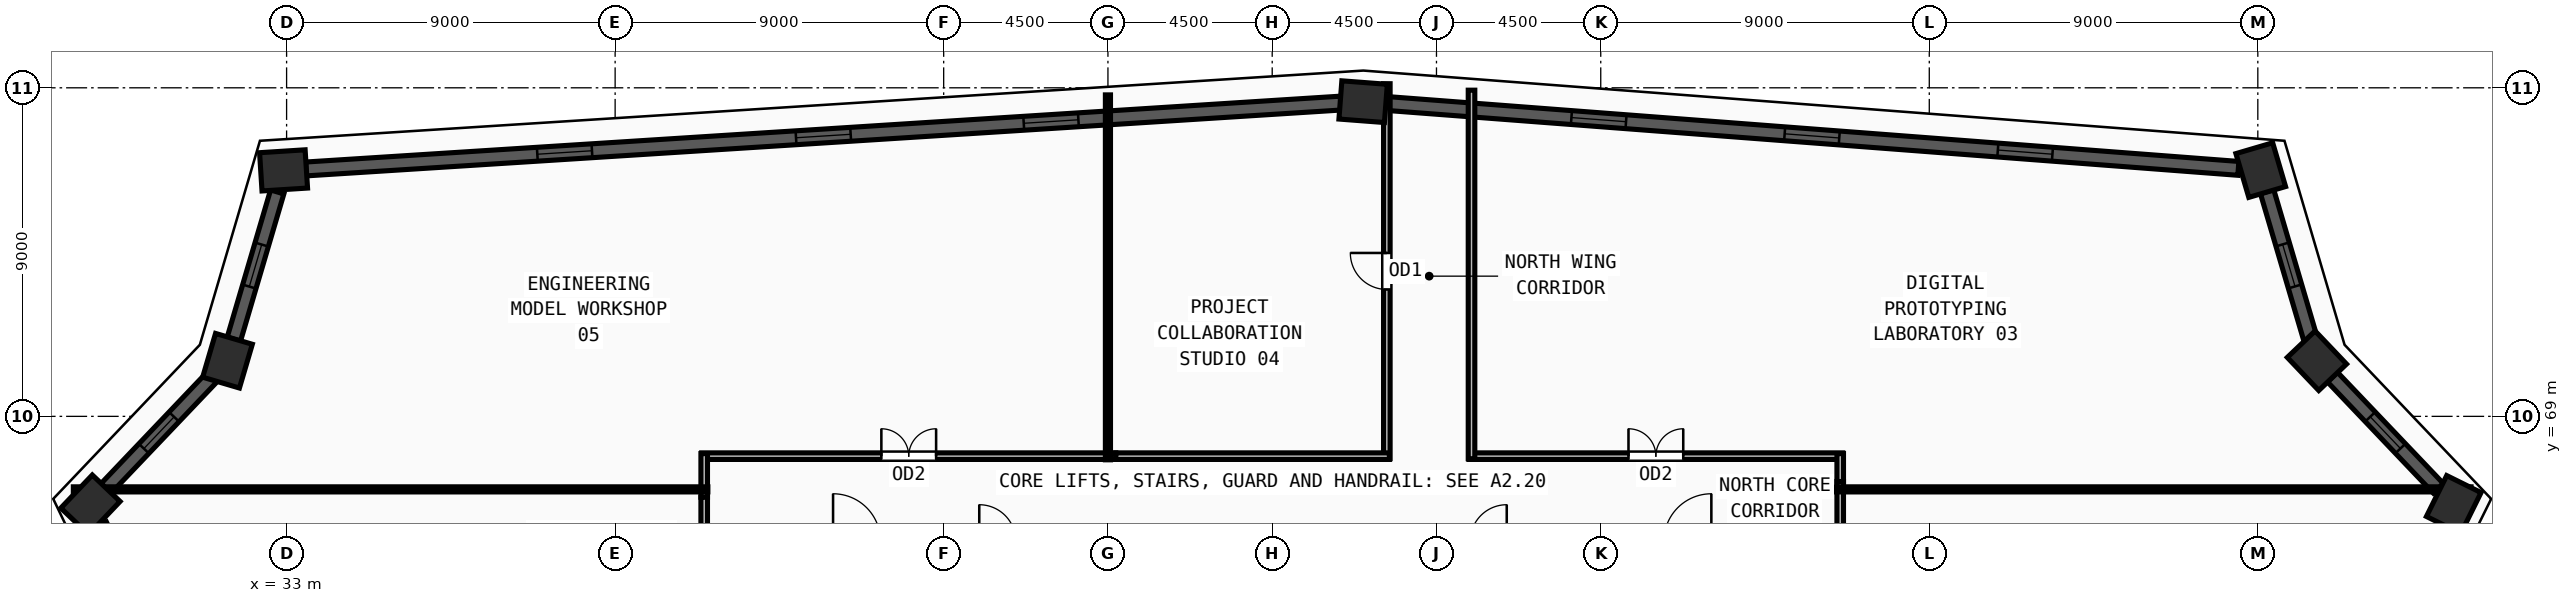
"""IFC4 building model, lengths in metres.
Left out: names, types, materials, properties, quantities, classifications, styles, units other than length and angle.
Written with IfcOpenShell. Run it as: python <this file> out.ifc"""

import sys

from ifc_helpers import new_model, si_unit, direction, frame, frame_2d, origin, origin_2d, place, context, subcontext, project, spatial, rectangle, extrude, source, transform, mapped, element, fill, save


model = new_model("IFC4")
c1 = context("Model", 3, precision=1e-05, world=origin(), true_north=direction((0.0, 1.0)))
c2 = subcontext(c1, "Body", "Model", "MODEL_VIEW")
j1 = project(units=[si_unit("LENGTHUNIT", "METRE"), si_unit("PLANEANGLEUNIT", "RADIAN")], contexts=[c1])
p1 = place(None, origin())
s1 = spatial("IfcSite", under=j1, at=p1, CompositionType="ELEMENT")
p2 = place(p1, origin())
s2 = spatial("IfcBuilding", under=s1, at=p2, CompositionType="ELEMENT")
p3 = place(p2, frame((0.0, 0.0, 236.25)))
s3 = spatial("IfcBuildingStorey", under=s2, at=p3, CompositionType="ELEMENT", Elevation=236.25)
m1 = source(origin(), c2, "Body", "SweptSolid", [
    extrude(rectangle(XDim=1.25, YDim=1.05, at=origin_2d()), origin(), (0.0, 0.0, 1.0), 3.75),
])
for number, where, z_axis, x_axis in (
    (1, (27.627, 66.579, 0.0), (0.0, 0.0, 1.0), (0.689, 0.724, 0.0)),
    (2, (31.381, 70.524, 0.0), (0.0, 0.0, 1.0), (0.283, 0.959, 0.0)),
    (3, (32.917, 75.738, 0.0), (0.0, 0.0, 1.0), (0.998, 0.063, 0.0)),
    (4, (62.491, 77.62, 0.0), (0.0, 0.0, 1.0), (-0.997, 0.076, 0.0)),
    (5, (87.08, 75.746, 0.0), (0.0, 0.0, 1.0), (-0.283, 0.959, 0.0)),
    (6, (88.619, 70.524, 0.0), (0.0, 0.0, 1.0), (-0.689, 0.724, 0.0)),
    (7, (92.367, 66.585, 0.0), (0.0, 0.0, 1.0), (0.444, 0.896, 0.0)),
):
    element("IfcColumn", number, at=place(p3, frame(where, z_axis=z_axis, x_axis=x_axis)), inside=s3, PredefinedType="COLUMN", context=c2, shape_type="MappedRepresentation", body=[
        mapped(m1, transform((0.0, 0.0, 0.0), x_axis=(1.0, 0.0, 0.0), y_axis=(0.0, 1.0, 0.0), z_axis=(0.0, 0.0, 1.0), scale=1.0)),
    ])
p4 = place(p3, frame((79.483, 40.585, 0.0), z_axis=(0.0, 0.0, 1.0), x_axis=(0.444016540866, 0.896018588779, 0.0)))
e8 = element("IfcWall", 8, at=p4, inside=s3, PredefinedType="SOLIDWALL", context=c2, shape_type="SweptSolid", body=[
    extrude(rectangle(XDim=28.402, YDim=0.38, at=frame_2d((14.201, 0.0))), origin(), (0.0, 0.0, 1.0), 3.57),
])
m2 = source(origin(), c2, "Body", "SweptSolid", [
    extrude(rectangle(XDim=1.5, YDim=1.9, at=frame_2d((0.75, 0.95))), frame((0.0, 0.2, 0.0), z_axis=(0.0, -1.0, 0.0), x_axis=(1.0, 0.0, 0.0)), (0.0, 0.0, 1.0), 0.4),
])
p5 = place(p4, frame((6.351, 0.0, 0.55)))
e9 = element("IfcOpeningElement", 9, at=p5, cuts=e8, PredefinedType="OPENING", context=c2, shape_type="MappedRepresentation", body=[
    mapped(m2, transform((0.0, 0.0, 0.0), x_axis=(1.0, 0.0, 0.0), y_axis=(0.0, 1.0, 0.0), z_axis=(0.0, 0.0, 1.0), scale=1.0)),
])
p6 = place(p4, frame((13.451, 0.0, 0.55)))
e10 = element("IfcOpeningElement", 10, at=p6, cuts=e8, PredefinedType="OPENING", context=c2, shape_type="MappedRepresentation", body=[
    mapped(m2, transform((0.0, 0.0, 0.0), x_axis=(1.0, 0.0, 0.0), y_axis=(0.0, 1.0, 0.0), z_axis=(0.0, 0.0, 1.0), scale=1.0)),
])
p7 = place(p4, frame((19.702, 0.0, 0.55)))
e11 = element("IfcOpeningElement", 11, at=p7, cuts=e8, PredefinedType="OPENING", context=c2, shape_type="MappedRepresentation", body=[
    mapped(m2, transform((0.0, 0.0, 0.0), x_axis=(1.0, 0.0, 0.0), y_axis=(0.0, 1.0, 0.0), z_axis=(0.0, 0.0, 1.0), scale=1.0)),
])
p8 = place(p3, frame((91.943, 67.031, 0.0), z_axis=(0.0, 0.0, 1.0), x_axis=(-0.689450799111, 0.724332517291, 0.0)))
e12 = element("IfcWall", 12, at=p8, inside=s3, PredefinedType="SOLIDWALL", context=c2, shape_type="SweptSolid", body=[
    extrude(rectangle(XDim=4.207, YDim=0.38, at=frame_2d((2.103, 0.0))), origin(), (0.0, 0.0, 1.0), 3.57),
])
m3 = source(origin(), c2, "Body", "SweptSolid", [
    extrude(rectangle(XDim=1.2, YDim=1.9, at=frame_2d((0.6, 0.95))), frame((0.0, 0.2, 0.0), z_axis=(0.0, -1.0, 0.0), x_axis=(1.0, 0.0, 0.0)), (0.0, 0.0, 1.0), 0.4),
])
p9 = place(p8, frame((1.503, 0.0, 0.55)))
e13 = element("IfcOpeningElement", 13, at=p9, cuts=e12, PredefinedType="OPENING", context=c2, shape_type="MappedRepresentation", body=[
    mapped(m3, transform((0.0, 0.0, 0.0), x_axis=(1.0, 0.0, 0.0), y_axis=(0.0, 1.0, 0.0), z_axis=(0.0, 0.0, 1.0), scale=1.0)),
])
p10 = place(p3, frame((88.445, 71.114, 0.0), z_axis=(0.0, 0.0, 1.0), x_axis=(-0.282677574057, 0.959214985874, 0.0)))
e14 = element("IfcWall", 14, at=p10, inside=s3, PredefinedType="SOLIDWALL", context=c2, shape_type="SweptSolid", body=[
    extrude(rectangle(XDim=4.214, YDim=0.38, at=frame_2d((2.107, 0.0))), origin(), (0.0, 0.0, 1.0), 3.57),
])
p11 = place(p10, frame((1.507, 0.0, 0.55)))
e15 = element("IfcOpeningElement", 15, at=p11, cuts=e14, PredefinedType="OPENING", context=c2, shape_type="MappedRepresentation", body=[
    mapped(m3, transform((0.0, 0.0, 0.0), x_axis=(1.0, 0.0, 0.0), y_axis=(0.0, 1.0, 0.0), z_axis=(0.0, 0.0, 1.0), scale=1.0)),
])
p12 = place(p3, frame((86.467, 75.793, 0.0), z_axis=(0.0, 0.0, 1.0), x_axis=(-0.997110119143, 0.075969798617, 0.0)))
e16 = element("IfcWall", 16, at=p12, inside=s3, PredefinedType="SOLIDWALL", context=c2, shape_type="SweptSolid", body=[
    extrude(rectangle(XDim=23.431, YDim=0.38, at=frame_2d((11.715, 0.0))), origin(), (0.0, 0.0, 1.0), 3.57),
])
p13 = place(p12, frame((5.108, 0.0, 0.55)))
e17 = element("IfcOpeningElement", 17, at=p13, cuts=e16, PredefinedType="OPENING", context=c2, shape_type="MappedRepresentation", body=[
    mapped(m2, transform((0.0, 0.0, 0.0), x_axis=(1.0, 0.0, 0.0), y_axis=(0.0, 1.0, 0.0), z_axis=(0.0, 0.0, 1.0), scale=1.0)),
])
p14 = place(p12, frame((10.965, 0.0, 0.55)))
e18 = element("IfcOpeningElement", 18, at=p14, cuts=e16, PredefinedType="OPENING", context=c2, shape_type="MappedRepresentation", body=[
    mapped(m2, transform((0.0, 0.0, 0.0), x_axis=(1.0, 0.0, 0.0), y_axis=(0.0, 1.0, 0.0), z_axis=(0.0, 0.0, 1.0), scale=1.0)),
])
p15 = place(p12, frame((16.823, 0.0, 0.55)))
e19 = element("IfcOpeningElement", 19, at=p15, cuts=e16, PredefinedType="OPENING", context=c2, shape_type="MappedRepresentation", body=[
    mapped(m2, transform((0.0, 0.0, 0.0), x_axis=(1.0, 0.0, 0.0), y_axis=(0.0, 1.0, 0.0), z_axis=(0.0, 0.0, 1.0), scale=1.0)),
])
p16 = place(p3, frame((61.877, 77.581, 0.0), z_axis=(0.0, 0.0, 1.0), x_axis=(-0.997981063215, -0.063512183593, 0.0)))
e20 = element("IfcWall", 20, at=p16, inside=s3, PredefinedType="SOLIDWALL", context=c2, shape_type="SweptSolid", body=[
    extrude(rectangle(XDim=28.403, YDim=0.38, at=frame_2d((14.202, 0.0))), origin(), (0.0, 0.0, 1.0), 3.57),
])
p17 = place(p16, frame((7.201, 0.0, 0.55)))
e21 = element("IfcOpeningElement", 21, at=p17, cuts=e20, PredefinedType="OPENING", context=c2, shape_type="MappedRepresentation", body=[
    mapped(m2, transform((0.0, 0.0, 0.0), x_axis=(1.0, 0.0, 0.0), y_axis=(0.0, 1.0, 0.0), z_axis=(0.0, 0.0, 1.0), scale=1.0)),
])
p18 = place(p16, frame((13.452, 0.0, 0.55)))
e22 = element("IfcOpeningElement", 22, at=p18, cuts=e20, PredefinedType="OPENING", context=c2, shape_type="MappedRepresentation", body=[
    mapped(m2, transform((0.0, 0.0, 0.0), x_axis=(1.0, 0.0, 0.0), y_axis=(0.0, 1.0, 0.0), z_axis=(0.0, 0.0, 1.0), scale=1.0)),
])
p19 = place(p16, frame((20.553, 0.0, 0.55)))
e23 = element("IfcOpeningElement", 23, at=p19, cuts=e20, PredefinedType="OPENING", context=c2, shape_type="MappedRepresentation", body=[
    mapped(m2, transform((0.0, 0.0, 0.0), x_axis=(1.0, 0.0, 0.0), y_axis=(0.0, 1.0, 0.0), z_axis=(0.0, 0.0, 1.0), scale=1.0)),
])
p20 = place(p3, frame((32.743, 75.148, 0.0), z_axis=(0.0, 0.0, 1.0), x_axis=(-0.282502627228, -0.959266524804, 0.0)))
e24 = element("IfcWall", 24, at=p20, inside=s3, PredefinedType="SOLIDWALL", context=c2, shape_type="SweptSolid", body=[
    extrude(rectangle(XDim=4.205, YDim=0.38, at=frame_2d((2.103, 0.0))), origin(), (0.0, 0.0, 1.0), 3.57),
])
p21 = place(p20, frame((1.503, 0.0, 0.55)))
e25 = element("IfcOpeningElement", 25, at=p21, cuts=e24, PredefinedType="OPENING", context=c2, shape_type="MappedRepresentation", body=[
    mapped(m3, transform((0.0, 0.0, 0.0), x_axis=(1.0, 0.0, 0.0), y_axis=(0.0, 1.0, 0.0), z_axis=(0.0, 0.0, 1.0), scale=1.0)),
])
p22 = place(p3, frame((30.957, 70.078, 0.0), z_axis=(0.0, 0.0, 1.0), x_axis=(-0.689456996348, -0.724326618444, 0.0)))
e26 = element("IfcWall", 26, at=p22, inside=s3, PredefinedType="SOLIDWALL", context=c2, shape_type="SweptSolid", body=[
    extrude(rectangle(XDim=4.215, YDim=0.38, at=frame_2d((2.107, 0.0))), origin(), (0.0, 0.0, 1.0), 3.57),
])
p23 = place(p22, frame((1.507, 0.0, 0.55)))
e27 = element("IfcOpeningElement", 27, at=p23, cuts=e26, PredefinedType="OPENING", context=c2, shape_type="MappedRepresentation", body=[
    mapped(m3, transform((0.0, 0.0, 0.0), x_axis=(1.0, 0.0, 0.0), y_axis=(0.0, 1.0, 0.0), z_axis=(0.0, 0.0, 1.0), scale=1.0)),
])
p24 = place(p3, frame((27.893, 66.025, 0.0), z_axis=(0.0, 0.0, 1.0), x_axis=(0.432777471902, -0.901500781926, 0.0)))
e28 = element("IfcWall", 28, at=p24, inside=s3, PredefinedType="SOLIDWALL", context=c2, shape_type="SweptSolid", body=[
    extrude(rectangle(XDim=23.432, YDim=0.38, at=frame_2d((11.716, 0.0))), origin(), (0.0, 0.0, 1.0), 3.57),
])
p25 = place(p24, frame((5.108, 0.0, 0.55)))
e29 = element("IfcOpeningElement", 29, at=p25, cuts=e28, PredefinedType="OPENING", context=c2, shape_type="MappedRepresentation", body=[
    mapped(m2, transform((0.0, 0.0, 0.0), x_axis=(1.0, 0.0, 0.0), y_axis=(0.0, 1.0, 0.0), z_axis=(0.0, 0.0, 1.0), scale=1.0)),
])
p26 = place(p24, frame((10.966, 0.0, 0.55)))
e30 = element("IfcOpeningElement", 30, at=p26, cuts=e28, PredefinedType="OPENING", context=c2, shape_type="MappedRepresentation", body=[
    mapped(m2, transform((0.0, 0.0, 0.0), x_axis=(1.0, 0.0, 0.0), y_axis=(0.0, 1.0, 0.0), z_axis=(0.0, 0.0, 1.0), scale=1.0)),
])
p27 = place(p3, frame((75.56, 67.215, 0.0), z_axis=(0.0, 0.0, 1.0), x_axis=(0.0, -1.0, 0.0)))
e31 = element("IfcWall", 31, at=p27, inside=s3, PredefinedType="PARTITIONING", context=c2, shape_type="SweptSolid", body=[
    extrude(rectangle(XDim=6.5, YDim=0.18, at=frame_2d((3.25, 0.0))), origin(), (0.0, 0.0, 1.0), 3.57),
])
m4 = source(origin(), c2, "Body", "SweptSolid", [
    extrude(rectangle(XDim=1.0, YDim=2.2, at=frame_2d((0.5, 1.1))), frame((0.0, 0.1, 0.0), z_axis=(0.0, -1.0, 0.0), x_axis=(1.0, 0.0, 0.0)), (0.0, 0.0, 1.0), 0.2),
])
p28 = place(p27, frame((2.75, 0.0, 0.0)))
e32 = element("IfcOpeningElement", 32, at=p28, cuts=e31, PredefinedType="OPENING", context=c2, shape_type="MappedRepresentation", body=[
    mapped(m4, transform((0.0, 0.0, 0.0), x_axis=(1.0, 0.0, 0.0), y_axis=(0.0, 1.0, 0.0), z_axis=(0.0, 0.0, 1.0), scale=1.0)),
])
p29 = place(p3, frame((65.39, 67.91, 0.0), z_axis=(0.0, 0.0, 1.0), x_axis=(1.0, 0.0, 0.0)))
e33 = element("IfcWall", 33, at=p29, inside=s3, PredefinedType="PARTITIONING", context=c2, shape_type="SweptSolid", body=[
    extrude(rectangle(XDim=10.24, YDim=0.18, at=frame_2d((5.12, 0.0))), origin(), (0.0, 0.0, 1.0), 3.205),
])
m5 = source(origin(), c2, "Body", "SweptSolid", [
    extrude(rectangle(XDim=1.5, YDim=2.2, at=frame_2d((0.75, 1.1))), frame((0.0, 0.1, 0.0), z_axis=(0.0, -1.0, 0.0), x_axis=(1.0, 0.0, 0.0)), (0.0, 0.0, 1.0), 0.2),
])
p30 = place(p29, frame((4.37, 0.0, 0.0)))
e34 = element("IfcOpeningElement", 34, at=p30, cuts=e33, PredefinedType="OPENING", context=c2, shape_type="MappedRepresentation", body=[
    mapped(m5, transform((0.0, 0.0, 0.0), x_axis=(1.0, 0.0, 0.0), y_axis=(0.0, 1.0, 0.0), z_axis=(0.0, 0.0, 1.0), scale=1.0)),
])
p31 = place(p3, frame((63.14, 67.84, 0.0), z_axis=(0.0, 0.0, 1.0), x_axis=(0.0, 1.0, 0.0)))
e35 = element("IfcWall", 35, at=p31, inside=s3, PredefinedType="PARTITIONING", context=c2, shape_type="SweptSolid", body=[
    extrude(rectangle(XDim=10.272, YDim=0.18, at=frame_2d((5.136, 0.0))), origin(), (0.0, 0.0, 1.0), 3.57),
])
p32 = place(p31, frame((4.636, 0.0, 0.0)))
e36 = element("IfcOpeningElement", 36, at=p32, cuts=e35, PredefinedType="OPENING", context=c2, shape_type="MappedRepresentation", body=[
    mapped(m4, transform((0.0, 0.0, 0.0), x_axis=(1.0, 0.0, 0.0), y_axis=(0.0, 1.0, 0.0), z_axis=(0.0, 0.0, 1.0), scale=1.0)),
])
p33 = place(p3, frame((44.37, 67.91, 0.0), z_axis=(0.0, 0.0, 1.0), x_axis=(1.0, 0.0, 0.0)))
e37 = element("IfcWall", 37, at=p33, inside=s3, PredefinedType="PARTITIONING", context=c2, shape_type="SweptSolid", body=[
    extrude(rectangle(XDim=11.345, YDim=0.18, at=frame_2d((5.672, 0.0))), origin(), (0.0, 0.0, 1.0), 3.205),
])
p34 = place(p33, frame((4.923, 0.0, 0.0)))
e38 = element("IfcOpeningElement", 38, at=p34, cuts=e37, PredefinedType="OPENING", context=c2, shape_type="MappedRepresentation", body=[
    mapped(m5, transform((0.0, 0.0, 0.0), x_axis=(1.0, 0.0, 0.0), y_axis=(0.0, 1.0, 0.0), z_axis=(0.0, 0.0, 1.0), scale=1.0)),
])
p35 = place(p3, frame((65.46, 77.935, 0.0), z_axis=(0.0, 0.0, 1.0), x_axis=(0.0, -1.0, 0.0)))
e39 = element("IfcWall", 39, at=p35, inside=s3, PredefinedType="PARTITIONING", context=c2, shape_type="SweptSolid", body=[
    extrude(rectangle(XDim=10.095, YDim=0.18, at=frame_2d((5.047, 0.0))), origin(), (0.0, 0.0, 1.0), 3.57),
])
p36 = place(p3, frame((75.56, 67.98, 0.0), z_axis=(0.0, 0.0, 1.0), x_axis=(0.0, -1.0, 0.0)))
e40 = element("IfcWall", 40, at=p36, inside=s3, PredefinedType="PARTITIONING", context=c2, shape_type="SweptSolid", body=[
    extrude(rectangle(XDim=0.765, YDim=0.18, at=frame_2d((0.382, 0.0))), origin(), (0.0, 0.0, 1.0), 3.57),
])
p37 = place(p3, frame((55.715, 67.91, 0.0), z_axis=(0.0, 0.0, 1.0), x_axis=(1.0, 0.0, 0.0)))
e41 = element("IfcWall", 41, at=p37, inside=s3, PredefinedType="PARTITIONING", context=c2, shape_type="SweptSolid", body=[
    extrude(rectangle(XDim=7.495, YDim=0.18, at=frame_2d((3.748, 0.0))), origin(), (0.0, 0.0, 1.0), 3.57),
])
p38 = place(p3, frame((44.44, 66.785, 0.0), z_axis=(0.0, 0.0, 1.0), x_axis=(0.0, 1.0, 0.0)))
e42 = element("IfcWall", 42, at=p38, inside=s3, PredefinedType="PARTITIONING", context=c2, shape_type="SweptSolid", body=[
    extrude(rectangle(XDim=1.195, YDim=0.18, at=frame_2d((0.598, 0.0))), origin(), (0.0, 0.0, 1.0), 3.57),
])
p39 = place(p3, frame((44.44, 64.98, 0.0), z_axis=(0.0, 0.0, 1.0), x_axis=(0.0, 1.0, 0.0)))
e43 = element("IfcWall", 43, at=p39, inside=s3, PredefinedType="PARTITIONING", context=c2, shape_type="SweptSolid", body=[
    extrude(rectangle(XDim=1.805, YDim=0.18, at=frame_2d((0.902, 0.0))), origin(), (0.0, 0.0, 1.0), 3.57),
])
for number, where, z_axis, x_axis in (
    (44, (44.54, 67.0, 0.0), (0.0, 0.0, 1.0), (-1.0, 0.0, 0.0)),
    (45, (75.46, 67.0, 0.0), (0.0, 0.0, 1.0), (1.0, 0.0, 0.0)),
):
    element("IfcWall", number, at=place(p3, frame(where, z_axis=z_axis, x_axis=x_axis)), inside=s3, PredefinedType="PARTITIONING", context=c2, shape_type="SweptSolid", body=[
        extrude(rectangle(XDim=17.382, YDim=0.14, at=frame_2d((8.691, 0.0))), origin(), (0.0, 0.0, 1.0), 3.57),
    ])
p40 = place(p3, frame((55.5, 67.81, 0.0), z_axis=(0.0, 0.0, 1.0), x_axis=(0.0, 1.0, 0.0)))
e46 = element("IfcWall", 46, at=p40, inside=s3, PredefinedType="PARTITIONING", context=c2, shape_type="SweptSolid", body=[
    extrude(rectangle(XDim=9.996, YDim=0.14, at=frame_2d((4.998, 0.0))), origin(), (0.0, 0.0, 1.0), 3.57),
])
m6 = source(origin(), c2, "Body", "SweptSolid", [
    extrude(rectangle(XDim=1.2, YDim=1.9, at=frame_2d((0.6, 0.95))), frame((0.0, 0.03, 0.0), z_axis=(0.0, -1.0, 0.0), x_axis=(1.0, 0.0, 0.0)), (0.0, 0.0, 1.0), 0.06),
])
p41 = place(p9, origin())
e47 = element("IfcWindow", 47, at=p41, inside=s3, PartitioningType="SINGLE_PANEL", PredefinedType="WINDOW", context=c2, shape_type="MappedRepresentation", body=[
    mapped(m6, transform((0.0, 0.0, 0.0), x_axis=(1.0, 0.0, 0.0), y_axis=(0.0, 1.0, 0.0), z_axis=(0.0, 0.0, 1.0), scale=1.0)),
])
fill(e13, e47)
p42 = place(p11, origin())
e48 = element("IfcWindow", 48, at=p42, inside=s3, PartitioningType="SINGLE_PANEL", PredefinedType="WINDOW", context=c2, shape_type="MappedRepresentation", body=[
    mapped(m6, transform((0.0, 0.0, 0.0), x_axis=(1.0, 0.0, 0.0), y_axis=(0.0, 1.0, 0.0), z_axis=(0.0, 0.0, 1.0), scale=1.0)),
])
fill(e15, e48)
m7 = source(origin(), c2, "Body", "SweptSolid", [
    extrude(rectangle(XDim=1.5, YDim=1.9, at=frame_2d((0.75, 0.95))), frame((0.0, 0.03, 0.0), z_axis=(0.0, -1.0, 0.0), x_axis=(1.0, 0.0, 0.0)), (0.0, 0.0, 1.0), 0.06),
])
p43 = place(p13, origin())
e49 = element("IfcWindow", 49, at=p43, inside=s3, PartitioningType="DOUBLE_PANEL_VERTICAL", PredefinedType="WINDOW", context=c2, shape_type="MappedRepresentation", body=[
    mapped(m7, transform((0.0, 0.0, 0.0), x_axis=(1.0, 0.0, 0.0), y_axis=(0.0, 1.0, 0.0), z_axis=(0.0, 0.0, 1.0), scale=1.0)),
])
fill(e17, e49)
p44 = place(p14, origin())
e50 = element("IfcWindow", 50, at=p44, inside=s3, PartitioningType="DOUBLE_PANEL_VERTICAL", PredefinedType="WINDOW", context=c2, shape_type="MappedRepresentation", body=[
    mapped(m7, transform((0.0, 0.0, 0.0), x_axis=(1.0, 0.0, 0.0), y_axis=(0.0, 1.0, 0.0), z_axis=(0.0, 0.0, 1.0), scale=1.0)),
])
fill(e18, e50)
p45 = place(p15, origin())
e51 = element("IfcWindow", 51, at=p45, inside=s3, PartitioningType="DOUBLE_PANEL_VERTICAL", PredefinedType="WINDOW", context=c2, shape_type="MappedRepresentation", body=[
    mapped(m7, transform((0.0, 0.0, 0.0), x_axis=(1.0, 0.0, 0.0), y_axis=(0.0, 1.0, 0.0), z_axis=(0.0, 0.0, 1.0), scale=1.0)),
])
fill(e19, e51)
p46 = place(p17, origin())
e52 = element("IfcWindow", 52, at=p46, inside=s3, PartitioningType="DOUBLE_PANEL_VERTICAL", PredefinedType="WINDOW", context=c2, shape_type="MappedRepresentation", body=[
    mapped(m7, transform((0.0, 0.0, 0.0), x_axis=(1.0, 0.0, 0.0), y_axis=(0.0, 1.0, 0.0), z_axis=(0.0, 0.0, 1.0), scale=1.0)),
])
fill(e21, e52)
p47 = place(p18, origin())
e53 = element("IfcWindow", 53, at=p47, inside=s3, PartitioningType="DOUBLE_PANEL_VERTICAL", PredefinedType="WINDOW", context=c2, shape_type="MappedRepresentation", body=[
    mapped(m7, transform((0.0, 0.0, 0.0), x_axis=(1.0, 0.0, 0.0), y_axis=(0.0, 1.0, 0.0), z_axis=(0.0, 0.0, 1.0), scale=1.0)),
])
fill(e22, e53)
p48 = place(p19, origin())
e54 = element("IfcWindow", 54, at=p48, inside=s3, PartitioningType="DOUBLE_PANEL_VERTICAL", PredefinedType="WINDOW", context=c2, shape_type="MappedRepresentation", body=[
    mapped(m7, transform((0.0, 0.0, 0.0), x_axis=(1.0, 0.0, 0.0), y_axis=(0.0, 1.0, 0.0), z_axis=(0.0, 0.0, 1.0), scale=1.0)),
])
fill(e23, e54)
p49 = place(p21, origin())
e55 = element("IfcWindow", 55, at=p49, inside=s3, PartitioningType="SINGLE_PANEL", PredefinedType="WINDOW", context=c2, shape_type="MappedRepresentation", body=[
    mapped(m6, transform((0.0, 0.0, 0.0), x_axis=(1.0, 0.0, 0.0), y_axis=(0.0, 1.0, 0.0), z_axis=(0.0, 0.0, 1.0), scale=1.0)),
])
fill(e25, e55)
p50 = place(p23, origin())
e56 = element("IfcWindow", 56, at=p50, inside=s3, PartitioningType="SINGLE_PANEL", PredefinedType="WINDOW", context=c2, shape_type="MappedRepresentation", body=[
    mapped(m6, transform((0.0, 0.0, 0.0), x_axis=(1.0, 0.0, 0.0), y_axis=(0.0, 1.0, 0.0), z_axis=(0.0, 0.0, 1.0), scale=1.0)),
])
fill(e27, e56)
m8 = source(origin(), c2, "Body", "SweptSolid", [
    extrude(rectangle(XDim=1.5, YDim=2.2, at=frame_2d((0.75, 1.1))), frame((0.0, 0.025, 0.0), z_axis=(0.0, -1.0, 0.0), x_axis=(1.0, 0.0, 0.0)), (0.0, 0.0, 1.0), 0.05),
])
p51 = place(p30, origin())
e57 = element("IfcDoor", 57, at=p51, inside=s3, OperationType="DOUBLE_DOOR_SINGLE_SWING", PredefinedType="DOOR", context=c2, shape_type="MappedRepresentation", body=[
    mapped(m8, transform((0.0, 0.0, 0.0), x_axis=(1.0, 0.0, 0.0), y_axis=(0.0, 1.0, 0.0), z_axis=(0.0, 0.0, 1.0), scale=1.0)),
])
fill(e34, e57)
m9 = source(origin(), c2, "Body", "SweptSolid", [
    extrude(rectangle(XDim=1.0, YDim=2.2, at=frame_2d((0.5, 1.1))), frame((0.0, 0.025, 0.0), z_axis=(0.0, -1.0, 0.0), x_axis=(1.0, 0.0, 0.0)), (0.0, 0.0, 1.0), 0.05),
])
p52 = place(p32, origin())
e58 = element("IfcDoor", 58, at=p52, inside=s3, OperationType="SINGLE_SWING_RIGHT", PredefinedType="DOOR", context=c2, shape_type="MappedRepresentation", body=[
    mapped(m9, transform((0.0, 0.0, 0.0), x_axis=(1.0, 0.0, 0.0), y_axis=(0.0, 1.0, 0.0), z_axis=(0.0, 0.0, 1.0), scale=1.0)),
])
fill(e36, e58)
p53 = place(p34, origin())
e59 = element("IfcDoor", 59, at=p53, inside=s3, OperationType="DOUBLE_DOOR_SINGLE_SWING", PredefinedType="DOOR", context=c2, shape_type="MappedRepresentation", body=[
    mapped(m8, transform((0.0, 0.0, 0.0), x_axis=(1.0, 0.0, 0.0), y_axis=(0.0, 1.0, 0.0), z_axis=(0.0, 0.0, 1.0), scale=1.0)),
])
fill(e38, e59)
save(model, sys.argv[1])
